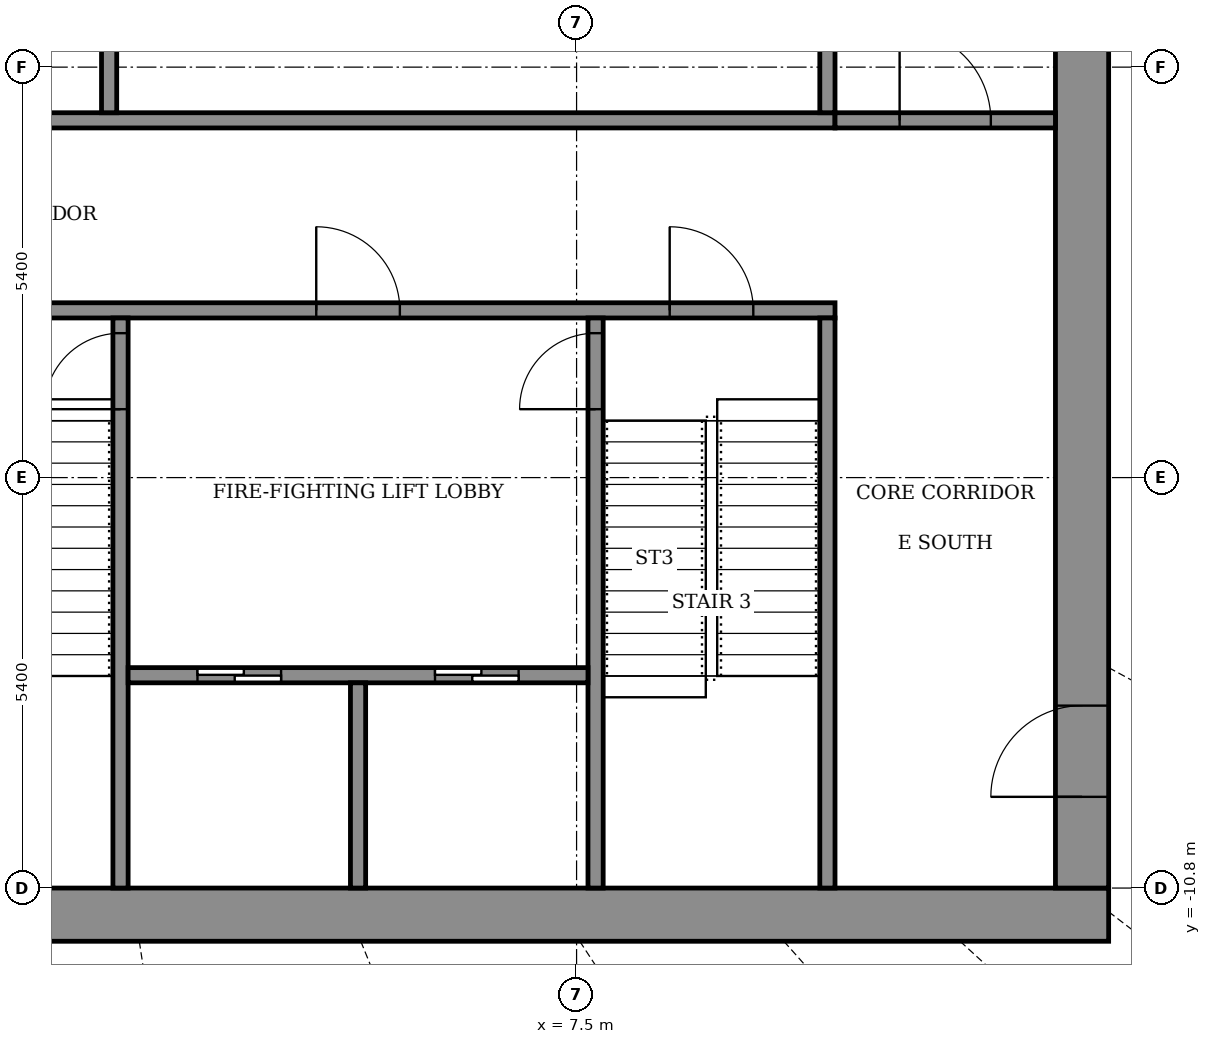
"""IFC4 building model, lengths in metres.
Left out: names, types, materials, properties, quantities, classifications, styles, units other than length and angle.
Written with IfcOpenShell. Run it as: python <this file> out.ifc"""

import sys

from ifc_helpers import new_model, si_unit, direction, frame, frame_2d, origin, place, context, subcontext, project, spatial, rectangle, extrude, element, fill, save


model = new_model("IFC4")
c1 = context("Model", 3, precision=1e-05, world=origin(), true_north=direction((0.0, 1.0)))
c2 = subcontext(c1, "Body", "Model", "MODEL_VIEW")
j1 = project(units=[si_unit("LENGTHUNIT", "METRE"), si_unit("PLANEANGLEUNIT", "RADIAN")], contexts=[c1])
p1 = place(None, origin())
s1 = spatial("IfcSite", under=j1, at=p1, CompositionType="ELEMENT")
p2 = place(p1, origin())
s2 = spatial("IfcBuilding", under=s1, at=p2, CompositionType="ELEMENT")
p3 = place(p2, frame((0.0, 0.0, 252.7)))
s3 = spatial("IfcBuildingStorey", under=s2, at=p3, CompositionType="ELEMENT", Elevation=252.7)
p4 = place(p3, frame((-14.5, -11.15, 0.0), z_axis=(0.0, 0.0, 1.0), x_axis=(1.0, 0.0, 0.0)))
e1 = element("IfcWall", 1, at=p4, inside=s3, PredefinedType="SHEAR", context=c2, shape_type="SweptSolid", body=[
    extrude(rectangle(XDim=29.0, YDim=0.7, at=frame_2d((14.5, 0.0))), origin(), (0.0, 0.0, 1.0), 4.6),
])
p5 = place(p3, frame((14.15, -10.8, 0.0), z_axis=(0.0, 0.0, 1.0), x_axis=(0.0, 1.0, 0.0)))
e2 = element("IfcWall", 2, at=p5, inside=s3, PredefinedType="SHEAR", context=c2, shape_type="SweptSolid", body=[
    extrude(rectangle(XDim=21.6, YDim=0.7, at=frame_2d((10.8, 0.0))), origin(), (0.0, 0.0, 1.0), 4.6),
])
p6 = place(p5, frame((1.2, 0.0, 0.0)))
e3 = element("IfcOpeningElement", 3, at=p6, cuts=e2, PredefinedType="OPENING", context=c2, shape_type="SweptSolid", body=[
    extrude(rectangle(XDim=1.2, YDim=2.1, at=frame_2d((0.6, 1.05))), frame((0.0, 0.36, 0.0), z_axis=(0.0, -1.0, 0.0), x_axis=(1.0, 0.0, 0.0)), (0.0, 0.0, 1.0), 0.72),
])
p7 = place(p3, frame((-10.9, -3.2, 0.0), z_axis=(0.0, 0.0, 1.0), x_axis=(1.0, 0.0, 0.0)))
e4 = element("IfcWall", 4, at=p7, inside=s3, PredefinedType="SHEAR", context=c2, shape_type="SweptSolid", body=[
    extrude(rectangle(XDim=21.8, YDim=0.2, at=frame_2d((10.9, 0.0))), origin(), (0.0, 0.0, 1.0), 4.05),
])
p8 = place(p7, frame((1.075, 0.0, 0.0)))
e5 = element("IfcOpeningElement", 5, at=p8, cuts=e4, PredefinedType="OPENING", context=c2, shape_type="SweptSolid", body=[
    extrude(rectangle(XDim=1.1, YDim=2.1, at=frame_2d((0.55, 1.05))), frame((0.0, 0.11, 0.0), z_axis=(0.0, -1.0, 0.0), x_axis=(1.0, 0.0, 0.0)), (0.0, 0.0, 1.0), 0.22),
])
p9 = place(p7, frame((10.325, 0.0, 0.0)))
e6 = element("IfcOpeningElement", 6, at=p9, cuts=e4, PredefinedType="OPENING", context=c2, shape_type="SweptSolid", body=[
    extrude(rectangle(XDim=1.1, YDim=2.1, at=frame_2d((0.55, 1.05))), frame((0.0, 0.11, 0.0), z_axis=(0.0, -1.0, 0.0), x_axis=(1.0, 0.0, 0.0)), (0.0, 0.0, 1.0), 0.22),
])
p10 = place(p7, frame((19.625, 0.0, 0.0)))
e7 = element("IfcOpeningElement", 7, at=p10, cuts=e4, PredefinedType="OPENING", context=c2, shape_type="SweptSolid", body=[
    extrude(rectangle(XDim=1.1, YDim=2.1, at=frame_2d((0.55, 1.05))), frame((0.0, 0.11, 0.0), z_axis=(0.0, -1.0, 0.0), x_axis=(1.0, 0.0, 0.0)), (0.0, 0.0, 1.0), 0.22),
])
p11 = place(p7, frame((5.7, 0.0, 0.0)))
e8 = element("IfcOpeningElement", 8, at=p11, cuts=e4, PredefinedType="OPENING", context=c2, shape_type="SweptSolid", body=[
    extrude(rectangle(XDim=1.1, YDim=2.1, at=frame_2d((0.55, 1.05))), frame((0.0, 0.11, 0.0), z_axis=(0.0, -1.0, 0.0), x_axis=(1.0, 0.0, 0.0)), (0.0, 0.0, 1.0), 0.22),
])
p12 = place(p7, frame((14.975, 0.0, 0.0)))
e9 = element("IfcOpeningElement", 9, at=p12, cuts=e4, PredefinedType="OPENING", context=c2, shape_type="SweptSolid", body=[
    extrude(rectangle(XDim=1.1, YDim=2.1, at=frame_2d((0.55, 1.05))), frame((0.0, 0.11, 0.0), z_axis=(0.0, -1.0, 0.0), x_axis=(1.0, 0.0, 0.0)), (0.0, 0.0, 1.0), 0.22),
])
p13 = place(p3, frame((-10.9, -0.7, 0.0), z_axis=(0.0, 0.0, 1.0), x_axis=(1.0, 0.0, 0.0)))
e10 = element("IfcWall", 10, at=p13, inside=s3, PredefinedType="SHEAR", context=c2, shape_type="SweptSolid", body=[
    extrude(rectangle(XDim=21.8, YDim=0.2, at=frame_2d((10.9, 0.0))), origin(), (0.0, 0.0, 1.0), 4.05),
])
p14 = place(p3, frame((1.5, -10.8, 0.0), z_axis=(0.0, 0.0, 1.0), x_axis=(0.0, 1.0, 0.0)))
e11 = element("IfcWall", 11, at=p14, inside=s3, PredefinedType="SHEAR", context=c2, shape_type="SweptSolid", body=[
    extrude(rectangle(XDim=7.5, YDim=0.2, at=frame_2d((3.75, 0.0))), origin(), (0.0, 0.0, 1.0), 4.05),
])
p15 = place(p14, frame((6.3, 0.0, 0.0)))
e12 = element("IfcOpeningElement", 12, at=p15, cuts=e11, PredefinedType="OPENING", context=c2, shape_type="SweptSolid", body=[
    extrude(rectangle(XDim=1.0, YDim=2.1, at=frame_2d((0.5, 1.05))), frame((0.0, 0.11, 0.0), z_axis=(0.0, -1.0, 0.0), x_axis=(1.0, 0.0, 0.0)), (0.0, 0.0, 1.0), 0.22),
])
p16 = place(p3, frame((7.75, -10.8, 0.0), z_axis=(0.0, 0.0, 1.0), x_axis=(0.0, 1.0, 0.0)))
e13 = element("IfcWall", 13, at=p16, inside=s3, PredefinedType="SHEAR", context=c2, shape_type="SweptSolid", body=[
    extrude(rectangle(XDim=7.5, YDim=0.2, at=frame_2d((3.75, 0.0))), origin(), (0.0, 0.0, 1.0), 4.05),
])
p17 = place(p16, frame((6.3, 0.0, 0.0)))
e14 = element("IfcOpeningElement", 14, at=p17, cuts=e13, PredefinedType="OPENING", context=c2, shape_type="SweptSolid", body=[
    extrude(rectangle(XDim=1.0, YDim=2.1, at=frame_2d((0.5, 1.05))), frame((0.0, 0.11, 0.0), z_axis=(0.0, -1.0, 0.0), x_axis=(1.0, 0.0, 0.0)), (0.0, 0.0, 1.0), 0.22),
])
p18 = place(p3, frame((10.8, -10.8, 0.0), z_axis=(0.0, 0.0, 1.0), x_axis=(0.0, 1.0, 0.0)))
e15 = element("IfcWall", 15, at=p18, inside=s3, PredefinedType="SHEAR", context=c2, shape_type="SweptSolid", body=[
    extrude(rectangle(XDim=7.5, YDim=0.2, at=frame_2d((3.75, 0.0))), origin(), (0.0, 0.0, 1.0), 4.05),
])
p19 = place(p3, frame((1.6, -8.0, 0.0), z_axis=(0.0, 0.0, 1.0), x_axis=(1.0, 0.0, 0.0)))
e16 = element("IfcWall", 16, at=p19, inside=s3, PredefinedType="SHEAR", context=c2, shape_type="SweptSolid", body=[
    extrude(rectangle(XDim=6.05, YDim=0.2, at=frame_2d((3.025, 0.0))), origin(), (0.0, 0.0, 1.0), 4.05),
])
p20 = place(p19, frame((0.913, 0.0, 0.0)))
e17 = element("IfcOpeningElement", 17, at=p20, cuts=e16, PredefinedType="OPENING", context=c2, shape_type="SweptSolid", body=[
    extrude(rectangle(XDim=1.1, YDim=2.1, at=frame_2d((0.55, 1.05))), frame((0.0, 0.11, 0.0), z_axis=(0.0, -1.0, 0.0), x_axis=(1.0, 0.0, 0.0)), (0.0, 0.0, 1.0), 0.22),
])
p21 = place(p19, frame((4.038, 0.0, 0.0)))
e18 = element("IfcOpeningElement", 18, at=p21, cuts=e16, PredefinedType="OPENING", context=c2, shape_type="SweptSolid", body=[
    extrude(rectangle(XDim=1.1, YDim=2.1, at=frame_2d((0.55, 1.05))), frame((0.0, 0.11, 0.0), z_axis=(0.0, -1.0, 0.0), x_axis=(1.0, 0.0, 0.0)), (0.0, 0.0, 1.0), 0.22),
])
p22 = place(p3, frame((4.625, -10.8, 0.0), z_axis=(0.0, 0.0, 1.0), x_axis=(0.0, 1.0, 0.0)))
e19 = element("IfcWall", 19, at=p22, inside=s3, PredefinedType="SHEAR", context=c2, shape_type="SweptSolid", body=[
    extrude(rectangle(XDim=2.7, YDim=0.2, at=frame_2d((1.35, 0.0))), origin(), (0.0, 0.0, 1.0), 4.05),
])
p23 = place(p3, frame((1.35, -0.6, 0.0), z_axis=(0.0, 0.0, 1.0), x_axis=(0.0, 1.0, 0.0)))
e20 = element("IfcWall", 20, at=p23, inside=s3, PredefinedType="SHEAR", context=c2, shape_type="SweptSolid", body=[
    extrude(rectangle(XDim=2.5, YDim=0.2, at=frame_2d((1.25, 0.0))), origin(), (0.0, 0.0, 1.0), 4.05),
])
p24 = place(p3, frame((10.8, -0.6, 0.0), z_axis=(0.0, 0.0, 1.0), x_axis=(0.0, 1.0, 0.0)))
e21 = element("IfcWall", 21, at=p24, inside=s3, PredefinedType="STANDARD", context=c2, shape_type="SweptSolid", body=[
    extrude(rectangle(XDim=2.5, YDim=0.2, at=frame_2d((1.25, 0.0))), origin(), (0.0, 0.0, 1.0), 4.05),
])
p25 = place(p3, frame((10.9, -0.7, 0.0), z_axis=(0.0, 0.0, 1.0), x_axis=(1.0, 0.0, 0.0)))
e22 = element("IfcWall", 22, at=p25, inside=s3, PredefinedType="STANDARD", context=c2, shape_type="SweptSolid", body=[
    extrude(rectangle(XDim=2.9, YDim=0.2, at=frame_2d((1.45, 0.0))), origin(), (0.0, 0.0, 1.0), 4.05),
])
p26 = place(p25, frame((0.85, 0.0, 0.0)))
e23 = element("IfcOpeningElement", 23, at=p26, cuts=e22, PredefinedType="OPENING", context=c2, shape_type="SweptSolid", body=[
    extrude(rectangle(XDim=1.2, YDim=2.1, at=frame_2d((0.6, 1.05))), frame((0.0, 0.11, 0.0), z_axis=(0.0, -1.0, 0.0), x_axis=(1.0, 0.0, 0.0)), (0.0, 0.0, 1.0), 0.22),
])
p27 = place(p6, origin())
e24 = element("IfcDoor", 24, at=p27, inside=s3, OperationType="DOUBLE_DOOR_SINGLE_SWING", PredefinedType="DOOR", context=c2, shape_type="SweptSolid", body=[
    extrude(rectangle(XDim=1.2, YDim=2.1, at=frame_2d((0.6, 1.05))), frame((0.0, 0.025, 0.0), z_axis=(0.0, -1.0, 0.0), x_axis=(1.0, 0.0, 0.0)), (0.0, 0.0, 1.0), 0.05),
])
fill(e3, e24)
p28 = place(p20, origin())
e25 = element("IfcDoor", 25, at=p28, inside=s3, OperationType="SLIDING_TO_LEFT", PredefinedType="DOOR", context=c2, shape_type="SweptSolid", body=[
    extrude(rectangle(XDim=1.1, YDim=2.1, at=frame_2d((0.55, 1.05))), frame((0.0, 0.025, 0.0), z_axis=(0.0, -1.0, 0.0), x_axis=(1.0, 0.0, 0.0)), (0.0, 0.0, 1.0), 0.05),
])
fill(e17, e25)
p29 = place(p21, origin())
e26 = element("IfcDoor", 26, at=p29, inside=s3, OperationType="SLIDING_TO_LEFT", PredefinedType="DOOR", context=c2, shape_type="SweptSolid", body=[
    extrude(rectangle(XDim=1.1, YDim=2.1, at=frame_2d((0.55, 1.05))), frame((0.0, 0.025, 0.0), z_axis=(0.0, -1.0, 0.0), x_axis=(1.0, 0.0, 0.0)), (0.0, 0.0, 1.0), 0.05),
])
fill(e18, e26)
p30 = place(p10, origin())
e27 = element("IfcDoor", 27, at=p30, inside=s3, OperationType="SINGLE_SWING_RIGHT", PredefinedType="DOOR", context=c2, shape_type="SweptSolid", body=[
    extrude(rectangle(XDim=1.1, YDim=2.1, at=frame_2d((0.55, 1.05))), frame((0.0, 0.025, 0.0), z_axis=(0.0, -1.0, 0.0), x_axis=(1.0, 0.0, 0.0)), (0.0, 0.0, 1.0), 0.05),
])
fill(e7, e27)
p31 = place(p12, origin())
e28 = element("IfcDoor", 28, at=p31, inside=s3, OperationType="SINGLE_SWING_LEFT", PredefinedType="DOOR", context=c2, shape_type="SweptSolid", body=[
    extrude(rectangle(XDim=1.1, YDim=2.1, at=frame_2d((0.55, 1.05))), frame((0.0, 0.025, 0.0), z_axis=(0.0, -1.0, 0.0), x_axis=(1.0, 0.0, 0.0)), (0.0, 0.0, 1.0), 0.05),
])
fill(e9, e28)
p32 = place(p15, origin())
e29 = element("IfcDoor", 29, at=p32, inside=s3, OperationType="SINGLE_SWING_RIGHT", PredefinedType="DOOR", context=c2, shape_type="SweptSolid", body=[
    extrude(rectangle(XDim=1.0, YDim=2.1, at=frame_2d((0.5, 1.05))), frame((0.0, 0.025, 0.0), z_axis=(0.0, -1.0, 0.0), x_axis=(1.0, 0.0, 0.0)), (0.0, 0.0, 1.0), 0.05),
])
fill(e12, e29)
p33 = place(p17, origin())
e30 = element("IfcDoor", 30, at=p33, inside=s3, OperationType="SINGLE_SWING_RIGHT", PredefinedType="DOOR", context=c2, shape_type="SweptSolid", body=[
    extrude(rectangle(XDim=1.0, YDim=2.1, at=frame_2d((0.5, 1.05))), frame((0.0, 0.025, 0.0), z_axis=(0.0, -1.0, 0.0), x_axis=(1.0, 0.0, 0.0)), (0.0, 0.0, 1.0), 0.05),
])
fill(e14, e30)
p34 = place(p26, origin())
e31 = element("IfcDoor", 31, at=p34, inside=s3, OperationType="SINGLE_SWING_LEFT", PredefinedType="DOOR", context=c2, shape_type="SweptSolid", body=[
    extrude(rectangle(XDim=1.2, YDim=2.1, at=frame_2d((0.6, 1.05))), frame((0.0, 0.025, 0.0), z_axis=(0.0, -1.0, 0.0), x_axis=(1.0, 0.0, 0.0)), (0.0, 0.0, 1.0), 0.05),
])
fill(e23, e31)
save(model, sys.argv[1])
